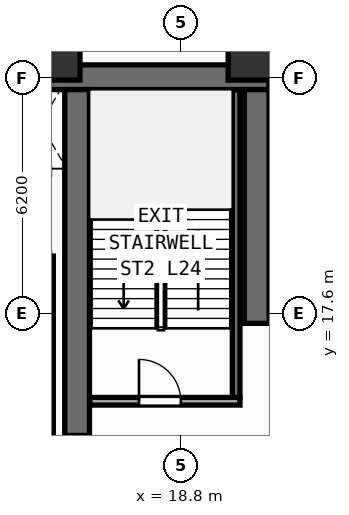
"""IFC4 building model, lengths in metres.
Left out: names, types, materials, properties, quantities, classifications, styles, units other than length and angle.
Written with IfcOpenShell. Run it as: python <this file> out.ifc"""

import sys

from ifc_helpers import new_model, si_unit, direction, frame, frame_2d, origin, origin_2d, place, context, subcontext, project, spatial, rectangle, extrude, element, fill, save


model = new_model("IFC4")
c1 = context("Model", 3, precision=1e-05, world=origin(), true_north=direction((0.0, 1.0)))
c2 = subcontext(c1, "Body", "Model", "MODEL_VIEW")
j1 = project(units=[si_unit("LENGTHUNIT", "METRE"), si_unit("PLANEANGLEUNIT", "RADIAN")], contexts=[c1])
p1 = place(None, origin())
s1 = spatial("IfcSite", under=j1, at=p1, CompositionType="ELEMENT")
p2 = place(p1, origin())
s2 = spatial("IfcBuilding", under=s1, at=p2, CompositionType="ELEMENT")
p3 = place(p2, frame((0.0, 0.0, 95.5)))
s3 = spatial("IfcBuildingStorey", under=s2, at=p3, CompositionType="ELEMENT", Elevation=95.5)
p4 = place(p3, frame((7.125, 23.825, 0.0), z_axis=(0.0, 0.0, 1.0), x_axis=(1.0, 0.0, 0.0)))
e1 = element("IfcWall", 1, at=p4, inside=s3, PredefinedType="SHEAR", context=c2, shape_type="SweptSolid", body=[
    extrude(rectangle(XDim=14.0, YDim=0.65, at=frame_2d((7.0, 0.0))), origin(), (0.0, 0.0, 1.0), 3.54),
])
p5 = place(p3, frame((20.8, 17.35, 0.0), z_axis=(0.0, 0.0, 1.0), x_axis=(0.0, 1.0, 0.0)))
e2 = element("IfcWall", 2, at=p5, inside=s3, PredefinedType="SHEAR", context=c2, shape_type="SweptSolid", body=[
    extrude(rectangle(XDim=6.15, YDim=0.65, at=frame_2d((3.075, 0.0))), origin(), (0.0, 0.0, 1.0), 3.54),
])
p6 = place(p3, frame((16.075, 14.4, 0.0), z_axis=(0.0, 0.0, 1.0), x_axis=(0.0, 1.0, 0.0)))
e3 = element("IfcWall", 3, at=p6, inside=s3, PredefinedType="SHEAR", context=c2, shape_type="SweptSolid", body=[
    extrude(rectangle(XDim=9.1, YDim=0.65, at=frame_2d((4.55, 0.0))), origin(), (0.0, 0.0, 1.0), 3.54),
])
for number, where, z_axis, x_axis in (
    (4, (15.45, 24.45, 0.0), (0.0, 0.0, 1.0), (1.0, 0.0, 0.0)),
    (5, (20.75, 24.45, 0.0), (0.0, 0.0, 1.0), (1.0, 0.0, 0.0)),
):
    element("IfcColumn", number, at=place(p3, frame(where, z_axis=z_axis, x_axis=x_axis)), inside=s3, PredefinedType="COLUMN", context=c2, shape_type="SweptSolid", body=[
        extrude(rectangle(XDim=1.4, YDim=1.4, at=origin_2d()), origin(), (0.0, 0.0, 1.0), 3.54),
    ])
p7 = place(p3, frame((20.26, 15.4, 0.0), z_axis=(0.0, 0.0, 1.0), x_axis=(0.0, 1.0, 0.0)))
e6 = element("IfcWall", 6, at=p7, inside=s3, PredefinedType="SHEAR", context=c2, shape_type="SweptSolid", body=[
    extrude(rectangle(XDim=8.09, YDim=0.2, at=frame_2d((4.045, 0.0))), origin(), (0.0, 0.0, 1.0), 3.54),
])
p8 = place(p3, frame((16.41, 15.3, 0.0), z_axis=(0.0, 0.0, 1.0), x_axis=(1.0, 0.0, 0.0)))
e7 = element("IfcWall", 7, at=p8, inside=s3, PredefinedType="PARTITIONING", context=c2, shape_type="SweptSolid", body=[
    extrude(rectangle(XDim=3.95, YDim=0.2, at=frame_2d((1.975, 0.0))), origin(), (0.0, 0.0, 1.0), 3.54),
])
p9 = place(p8, frame((1.294, 0.0, 0.0)))
e8 = element("IfcOpeningElement", 8, at=p9, cuts=e7, PredefinedType="OPENING", context=c2, shape_type="SweptSolid", body=[
    extrude(rectangle(XDim=1.1, YDim=2.2, at=frame_2d((0.55, 1.1))), frame((0.0, 0.11, 0.0), z_axis=(0.0, -1.0, 0.0), x_axis=(1.0, 0.0, 0.0)), (0.0, 0.0, 1.0), 0.22),
])
p10 = place(p3, frame((15.35, 14.22, 0.0), z_axis=(0.0, 0.0, 1.0), x_axis=(0.0, 1.0, 0.0)))
e9 = element("IfcWall", 9, at=p10, inside=s3, PredefinedType="PARTITIONING", context=c2, shape_type="SweptSolid", body=[
    extrude(rectangle(XDim=2.23, YDim=0.2, at=frame_2d((1.115, 0.0))), origin(), (0.0, 0.0, 1.0), 3.54),
])
p11 = place(p3, frame((15.35, 16.45, 0.0), z_axis=(0.0, 0.0, 1.0), x_axis=(0.0, 1.0, 0.0)))
e10 = element("IfcWall", 10, at=p11, inside=s3, PredefinedType="PARTITIONING", context=c2, shape_type="SweptSolid", body=[
    extrude(rectangle(XDim=2.67, YDim=0.2, at=frame_2d((1.335, 0.0))), origin(), (0.0, 0.0, 1.0), 3.54),
])
p12 = place(p9, origin())
e11 = element("IfcDoor", 11, at=p12, inside=s3, OperationType="SINGLE_SWING_LEFT", PredefinedType="DOOR", context=c2, shape_type="SweptSolid", body=[
    extrude(rectangle(XDim=1.1, YDim=2.2, at=frame_2d((0.55, 1.1))), frame((0.0, 0.025, 0.0), z_axis=(0.0, -1.0, 0.0), x_axis=(1.0, 0.0, 0.0)), (0.0, 0.0, 1.0), 0.05),
])
fill(e8, e11)
save(model, sys.argv[1])
